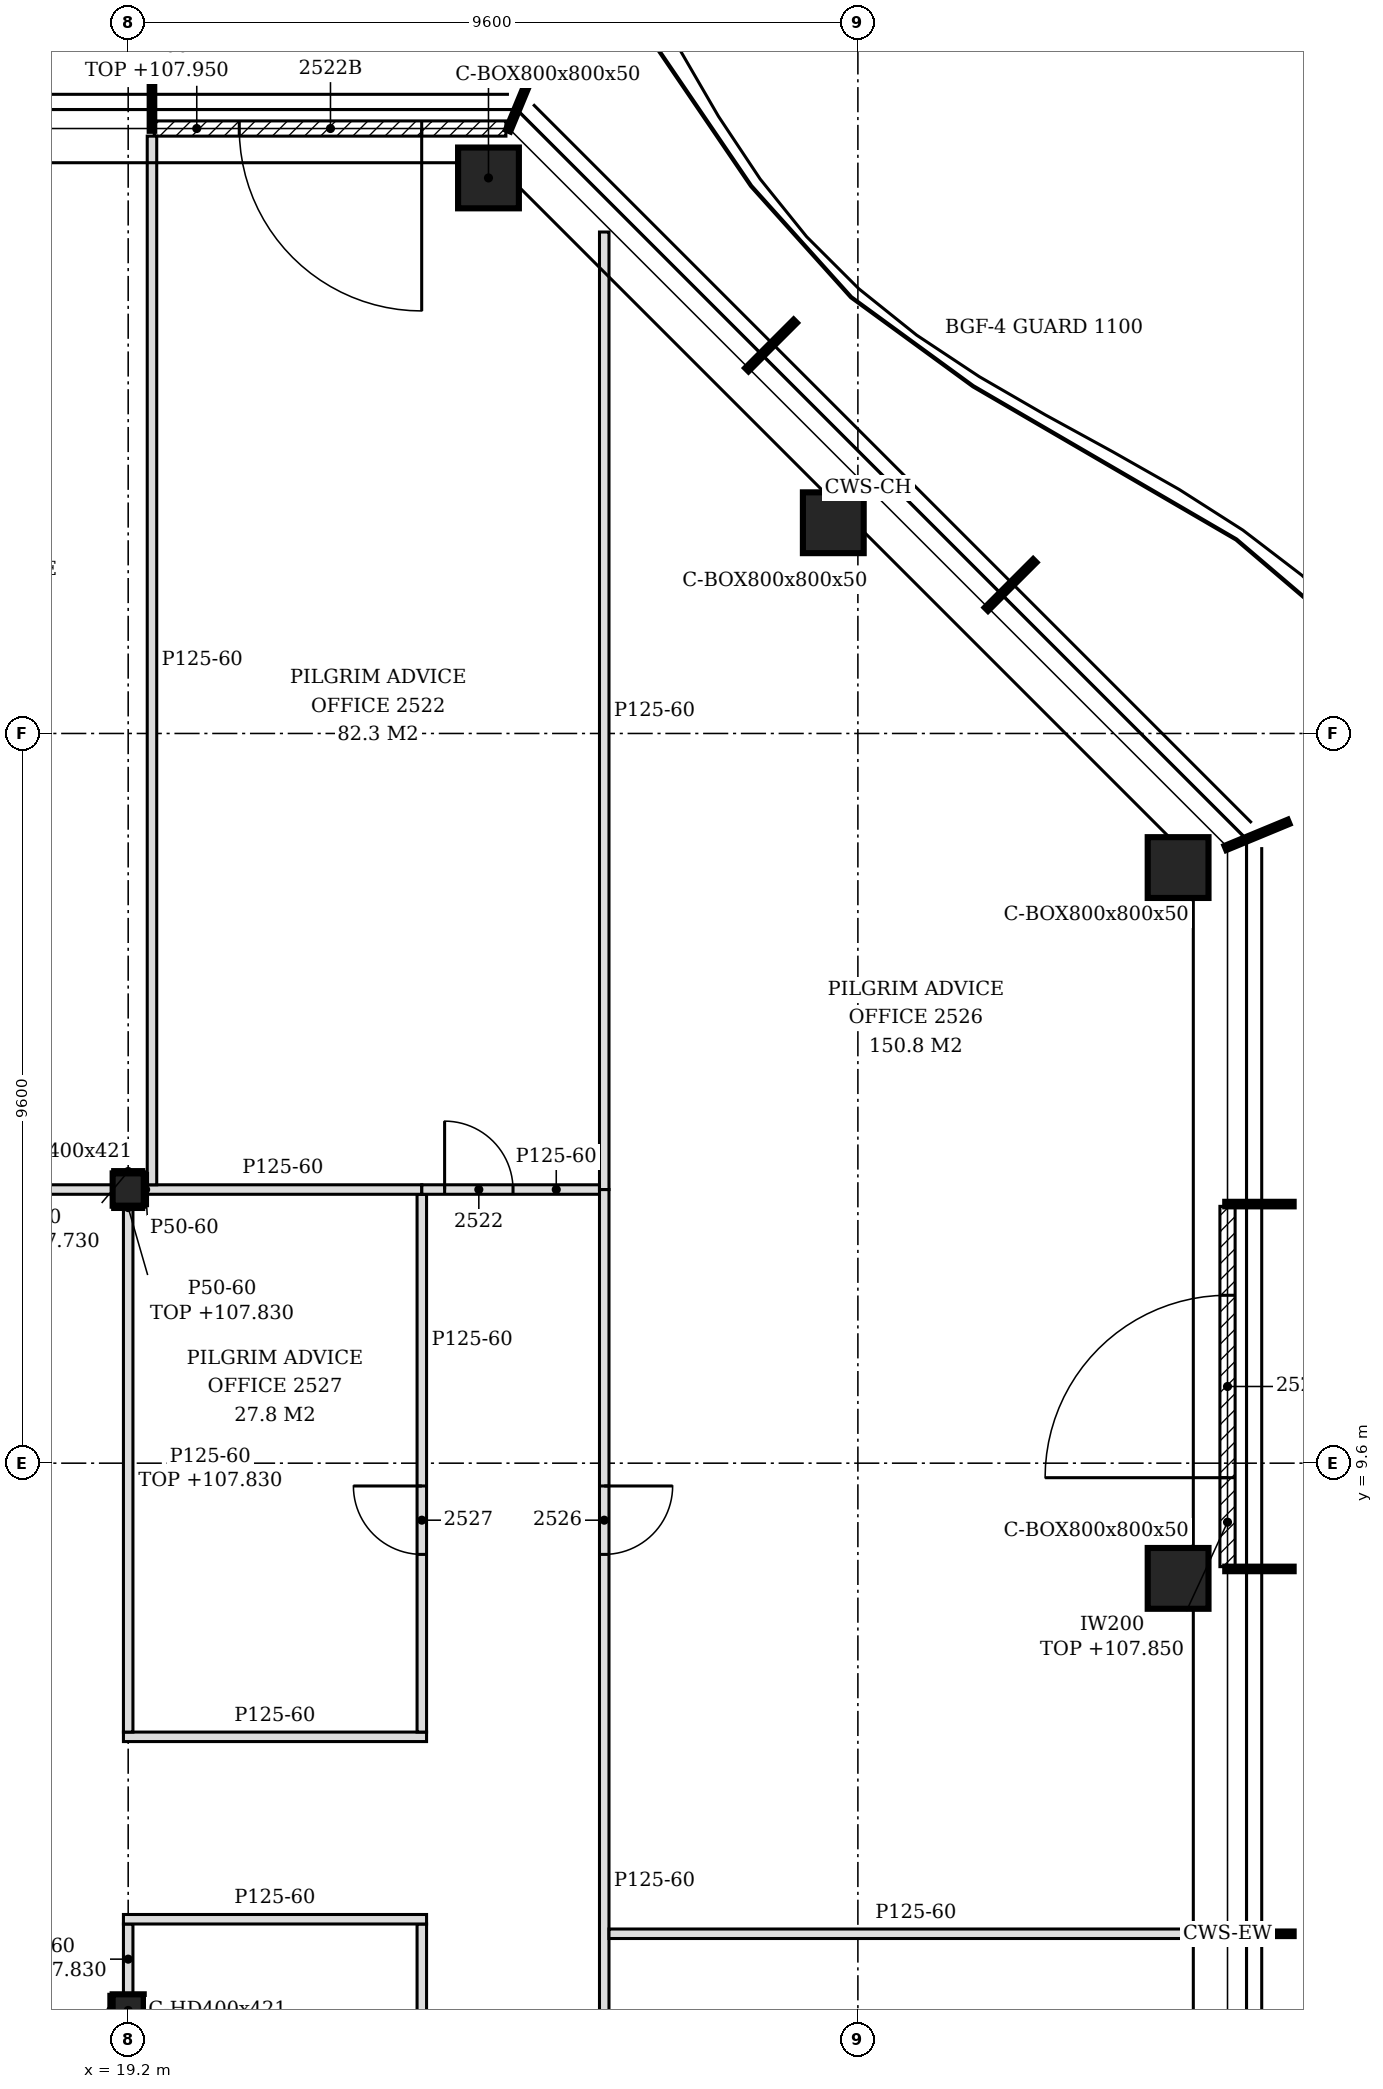
"""IFC4 building model, lengths in metres.
Left out: names, types, materials, properties, quantities, classifications, styles, units other than length and angle.
Written with IfcOpenShell. Run it as: python <this file> out.ifc"""

import sys

from ifc_helpers import new_model, si_unit, direction, frame, frame_2d, origin, origin_2d, place, context, subcontext, project, spatial, polyline, rectangle, hollow_rectangle, i_section, outline, extrude, clip, halfspace, element, fill, save


model = new_model("IFC4")
c1 = context("Model", 3, precision=1e-05, world=origin(), true_north=direction((0.0, 1.0)))
c2 = subcontext(c1, "Body", "Model", "MODEL_VIEW")
j1 = project(units=[si_unit("LENGTHUNIT", "METRE"), si_unit("PLANEANGLEUNIT", "RADIAN")], contexts=[c1])
p1 = place(None, origin())
s1 = spatial("IfcSite", under=j1, at=p1, CompositionType="ELEMENT")
p2 = place(p1, origin())
s2 = spatial("IfcBuilding", under=s1, at=p2, CompositionType="ELEMENT")
p3 = place(p2, frame((0.0, 0.0, 105.0)))
s3 = spatial("IfcBuildingStorey", under=s2, at=p3, CompositionType="ELEMENT", Elevation=105.0)
for number, where, z_axis, x_axis in (
    (1, (33.013, 8.084, -0.15), (0.282, 0.188, 0.941), (-0.555, 0.832, 0.0)),
    (2, (33.013, 17.436, -0.15), (0.282, 0.188, 0.941), (-0.555, 0.832, 0.0)),
    (3, (28.477, 21.972, -0.15), (0.282, 0.188, 0.941), (-0.555, 0.832, 0.0)),
    (4, (23.94, 26.509, -0.15), (0.282, 0.188, 0.941), (-0.555, 0.832, 0.0)),
):
    element("IfcColumn", number, at=place(p3, frame(where, z_axis=z_axis, x_axis=x_axis)), inside=s3, PredefinedType="COLUMN", context=c2, shape_type="Clipping", body=[
        clip(clip(extrude(hollow_rectangle(XDim=0.8, YDim=0.8, WallThickness=0.05, at=origin_2d()), origin(), (0.0, 0.0, 1.0), 3.826), halfspace(frame((0.0, 0.0, 0.024), z_axis=(0.0, 0.0, 1.0), x_axis=(1.0, 0.0, 0.0)), True)), halfspace(frame((0.0, 0.0, 3.802), z_axis=(0.0, 0.0, 1.0), x_axis=(1.0, 0.0, 0.0)), False)),
    ])
for number, where, z_axis, x_axis in (
    (5, (19.2, 2.4, -0.15), (0.0, 0.0, 1.0), (1.0, 0.0, 0.0)),
    (6, (19.2, 13.2, -0.15), (0.0, 0.0, 1.0), (1.0, 0.0, 0.0)),
):
    element("IfcColumn", number, at=place(p3, frame(where, z_axis=z_axis, x_axis=x_axis)), inside=s3, PredefinedType="COLUMN", context=c2, shape_type="SweptSolid", body=[
        extrude(i_section(OverallWidth=0.409, OverallDepth=0.425, WebThickness=0.033, FlangeThickness=0.052, FilletRadius=0.015, at=origin_2d()), origin(), (0.0, 0.0, 1.0), 3.6),
    ])
p4 = place(p3, frame((33.663, 8.239, 0.0), z_axis=(0.0, 0.0, 1.0), x_axis=(0.0, 1.0, 0.0)))
e7 = element("IfcWall", 7, at=p4, inside=s3, PredefinedType="NOTDEFINED", context=c2, shape_type="SweptSolid", body=[
    extrude(rectangle(XDim=4.74, YDim=0.2, at=frame_2d((2.37, 0.0))), origin(), (0.0, 0.0, 1.0), 2.85),
])
p5 = place(p4, frame((1.17, 0.0, 0.0)))
e8 = element("IfcOpeningElement", 8, at=p5, cuts=e7, PredefinedType="OPENING", context=c2, shape_type="SweptSolid", body=[
    extrude(rectangle(XDim=2.4, YDim=2.4, at=frame_2d((1.2, 1.2))), frame((0.0, 0.11, 0.0), z_axis=(0.0, -1.0, 0.0), x_axis=(1.0, 0.0, 0.0)), (0.0, 0.0, 1.0), 0.22),
])
p6 = place(p3, frame((24.169, 27.159, 0.0), z_axis=(0.0, 0.0, 1.0), x_axis=(-1.0, 0.0, 0.0)))
e9 = element("IfcWall", 9, at=p6, inside=s3, PredefinedType="NOTDEFINED", context=c2, shape_type="SweptSolid", body=[
    extrude(rectangle(XDim=4.626, YDim=0.2, at=frame_2d((2.313, 0.0))), origin(), (0.0, 0.0, 1.0), 2.95),
])
p7 = place(p6, frame((1.108, 0.0, 0.0)))
e10 = element("IfcOpeningElement", 10, at=p7, cuts=e9, PredefinedType="OPENING", context=c2, shape_type="SweptSolid", body=[
    extrude(rectangle(XDim=2.4, YDim=2.4, at=frame_2d((1.2, 1.2))), frame((0.0, 0.11, 0.0), z_axis=(0.0, -1.0, 0.0), x_axis=(1.0, 0.0, 0.0)), (0.0, 0.0, 1.0), 0.22),
])
p8 = place(p3, frame((25.463, -14.2, 0.0), z_axis=(0.0, 0.0, 1.0), x_axis=(0.0, 1.0, 0.0)))
e11 = element("IfcWall", 11, at=p8, inside=s3, PredefinedType="PARTITIONING", context=c2, shape_type="SweptSolid", body=[
    extrude(outline(polyline([(0.0, 0.0), (27.4, 0.0), (27.4, 3.45), (23.238, 3.45), (23.236, 2.83), (23.018, 2.83), (23.016, 3.45), (18.438, 3.45), (18.436, 2.83), (18.218, 2.83), (18.216, 3.45), (13.638, 3.45), (13.636, 2.83), (13.418, 2.83), (13.416, 3.45), (8.838, 3.45), (8.836, 2.83), (8.618, 2.83), (8.616, 3.45), (4.038, 3.45), (4.036, 2.83), (3.818, 2.83), (3.816, 3.45), (0.0, 3.45), (0.0, 0.0)])), frame((0.0, 0.062, 0.0), z_axis=(0.0, -1.0, 0.0), x_axis=(1.0, 0.0, 0.0)), (0.0, 0.0, 1.0), 0.125),
])
p9 = place(p8, frame((6.809, 0.0, 0.0)))
e12 = element("IfcOpeningElement", 12, at=p9, cuts=e11, PredefinedType="OPENING", context=c2, shape_type="SweptSolid", body=[
    extrude(rectangle(XDim=0.9, YDim=2.1, at=frame_2d((0.45, 1.05))), frame((0.0, 0.073, 0.0), z_axis=(0.0, -1.0, 0.0), x_axis=(1.0, 0.0, 0.0)), (0.0, 0.0, 1.0), 0.145),
])
p10 = place(p8, frame((9.709, 0.0, 0.0)))
e13 = element("IfcOpeningElement", 13, at=p10, cuts=e11, PredefinedType="OPENING", context=c2, shape_type="SweptSolid", body=[
    extrude(rectangle(XDim=0.9, YDim=2.1, at=frame_2d((0.45, 1.05))), frame((0.0, 0.073, 0.0), z_axis=(0.0, -1.0, 0.0), x_axis=(1.0, 0.0, 0.0)), (0.0, 0.0, 1.0), 0.145),
])
p11 = place(p8, frame((13.109, 0.0, 0.0)))
e14 = element("IfcOpeningElement", 14, at=p11, cuts=e11, PredefinedType="OPENING", context=c2, shape_type="SweptSolid", body=[
    extrude(rectangle(XDim=0.9, YDim=2.1, at=frame_2d((0.45, 1.05))), frame((0.0, 0.073, 0.0), z_axis=(0.0, -1.0, 0.0), x_axis=(1.0, 0.0, 0.0)), (0.0, 0.0, 1.0), 0.145),
])
p12 = place(p8, frame((22.6, 0.0, 0.0)))
e15 = element("IfcOpeningElement", 15, at=p12, cuts=e11, PredefinedType="OPENING", context=c2, shape_type="SweptSolid", body=[
    extrude(rectangle(XDim=0.9, YDim=2.1, at=frame_2d((0.45, 1.05))), frame((0.0, 0.073, 0.0), z_axis=(0.0, -1.0, 0.0), x_axis=(1.0, 0.0, 0.0)), (0.0, 0.0, 1.0), 0.145),
])
p13 = place(p3, frame((23.063, -11.738, 0.0), z_axis=(0.0, 0.0, 1.0), x_axis=(0.0, 1.0, 0.0)))
e16 = element("IfcWall", 16, at=p13, inside=s3, PredefinedType="PARTITIONING", context=c2, shape_type="SweptSolid", body=[
    extrude(outline(polyline([(0.0, 0.0), (15.275, 0.0), (15.275, 3.45), (11.175, 3.45), (11.173, 2.83), (10.955, 2.83), (10.953, 3.45), (6.375, 3.45), (6.373, 2.83), (6.155, 2.83), (6.153, 3.45), (1.575, 3.45), (1.573, 2.83), (1.355, 2.83), (1.353, 3.45), (0.0, 3.45), (0.0, 0.0)])), frame((0.0, 0.062, 0.0), z_axis=(0.0, -1.0, 0.0), x_axis=(1.0, 0.0, 0.0)), (0.0, 0.0, 1.0), 0.125),
])
p14 = place(p13, frame((7.238, 0.0, 0.0)))
e17 = element("IfcOpeningElement", 17, at=p14, cuts=e16, PredefinedType="OPENING", context=c2, shape_type="SweptSolid", body=[
    extrude(rectangle(XDim=0.9, YDim=2.1, at=frame_2d((0.45, 1.05))), frame((0.0, 0.073, 0.0), z_axis=(0.0, -1.0, 0.0), x_axis=(1.0, 0.0, 0.0)), (0.0, 0.0, 1.0), 0.145),
])
p15 = place(p3, frame((19.2, 2.613, 0.0), z_axis=(0.0, 0.0, 1.0), x_axis=(0.0, 1.0, 0.0)))
e18 = element("IfcWall", 18, at=p15, inside=s3, PredefinedType="PARTITIONING", context=c2, shape_type="SweptSolid", body=[
    extrude(rectangle(XDim=0.925, YDim=0.125, at=frame_2d((0.462, 0.0))), origin(), (0.0, 0.0, 1.0), 2.83),
])
p16 = place(p3, frame((25.525, 3.409, 0.0), z_axis=(0.0, 0.0, 1.0), x_axis=(1.0, 0.0, 0.0)))
e19 = element("IfcWall", 19, at=p16, inside=s3, PredefinedType="PARTITIONING", context=c2, shape_type="SweptSolid", body=[
    extrude(rectangle(XDim=8.077, YDim=0.125, at=frame_2d((4.039, 0.0))), origin(), (0.0, 0.0, 1.0), 3.45),
])
for number, where, z_axis, x_axis in (
    (20, (19.137, 3.6, 0.0), (0.0, 0.0, 1.0), (1.0, 0.0, 0.0)),
    (21, (19.137, 6.0, 0.0), (0.0, 0.0, 1.0), (1.0, 0.0, 0.0)),
):
    element("IfcWall", number, at=place(p3, frame(where, z_axis=z_axis, x_axis=x_axis)), inside=s3, PredefinedType="PARTITIONING", context=c2, shape_type="SweptSolid", body=[
        extrude(outline(polyline([(0.0, 0.0), (3.988, 0.0), (3.988, 3.45), (0.212, 3.45), (0.21, 2.83), (0.0, 2.83), (0.0, 0.0)])), frame((0.0, 0.062, 0.0), z_axis=(0.0, -1.0, 0.0), x_axis=(1.0, 0.0, 0.0)), (0.0, 0.0, 1.0), 0.125),
    ])
p17 = place(p3, frame((19.2, 6.062, 0.0), z_axis=(0.0, 0.0, 1.0), x_axis=(0.0, 1.0, 0.0)))
e22 = element("IfcWall", 22, at=p17, inside=s3, PredefinedType="PARTITIONING", context=c2, shape_type="SweptSolid", body=[
    extrude(rectangle(XDim=6.925, YDim=0.125, at=frame_2d((3.462, 0.0))), origin(), (0.0, 0.0, 1.0), 2.83),
])
p18 = place(p3, frame((23.063, 6.062, 0.0), z_axis=(0.0, 0.0, 1.0), x_axis=(0.0, 1.0, 0.0)))
e23 = element("IfcWall", 23, at=p18, inside=s3, PredefinedType="PARTITIONING", context=c2, shape_type="SweptSolid", body=[
    extrude(outline(polyline([(0.0, 0.0), (7.075, 0.0), (7.075, 3.45), (2.975, 3.45), (2.973, 2.83), (2.755, 2.83), (2.753, 3.45), (0.0, 3.45), (0.0, 0.0)])), frame((0.0, 0.062, 0.0), z_axis=(0.0, -1.0, 0.0), x_axis=(1.0, 0.0, 0.0)), (0.0, 0.0, 1.0), 0.125),
])
p19 = place(p18, frame((2.337, 0.0, 0.0)))
e24 = element("IfcOpeningElement", 24, at=p19, cuts=e23, PredefinedType="OPENING", context=c2, shape_type="SweptSolid", body=[
    extrude(rectangle(XDim=0.9, YDim=2.1, at=frame_2d((0.45, 1.05))), frame((0.0, 0.073, 0.0), z_axis=(0.0, -1.0, 0.0), x_axis=(1.0, 0.0, 0.0)), (0.0, 0.0, 1.0), 0.145),
])
p20 = place(p3, frame((7.405, 13.2, 0.0), z_axis=(0.0, 0.0, 1.0), x_axis=(1.0, 0.0, 0.0)))
e25 = element("IfcWall", 25, at=p20, inside=s3, PredefinedType="PARTITIONING", context=c2, shape_type="SweptSolid", body=[
    extrude(rectangle(XDim=11.591, YDim=0.125, at=frame_2d((5.795, 0.0))), origin(), (0.0, 0.0, 1.0), 2.83),
])
p21 = place(p20, frame((1.309, 0.0, 0.0)))
e26 = element("IfcOpeningElement", 26, at=p21, cuts=e25, PredefinedType="OPENING", context=c2, shape_type="SweptSolid", body=[
    extrude(rectangle(XDim=0.9, YDim=2.1, at=frame_2d((0.45, 1.05))), frame((0.0, 0.073, 0.0), z_axis=(0.0, -1.0, 0.0), x_axis=(1.0, 0.0, 0.0)), (0.0, 0.0, 1.0), 0.145),
])
p22 = place(p20, frame((2.809, 0.0, 0.0)))
e27 = element("IfcOpeningElement", 27, at=p22, cuts=e25, PredefinedType="OPENING", context=c2, shape_type="SweptSolid", body=[
    extrude(rectangle(XDim=0.9, YDim=2.1, at=frame_2d((0.45, 1.05))), frame((0.0, 0.073, 0.0), z_axis=(0.0, -1.0, 0.0), x_axis=(1.0, 0.0, 0.0)), (0.0, 0.0, 1.0), 0.145),
])
p23 = place(p20, frame((7.608, 0.0, 0.0)))
e28 = element("IfcOpeningElement", 28, at=p23, cuts=e25, PredefinedType="OPENING", context=c2, shape_type="SweptSolid", body=[
    extrude(rectangle(XDim=0.9, YDim=2.1, at=frame_2d((0.45, 1.05))), frame((0.0, 0.073, 0.0), z_axis=(0.0, -1.0, 0.0), x_axis=(1.0, 0.0, 0.0)), (0.0, 0.0, 1.0), 0.145),
])
p24 = place(p3, frame((19.405, 13.2, 0.0), z_axis=(0.0, 0.0, 1.0), x_axis=(1.0, 0.0, 0.0)))
e29 = element("IfcWall", 29, at=p24, inside=s3, PredefinedType="PARTITIONING", context=c2, shape_type="SweptSolid", body=[
    extrude(rectangle(XDim=3.658, YDim=0.125, at=frame_2d((1.829, 0.0))), origin(), (0.0, 0.0, 1.0), 3.45),
])
p25 = place(p3, frame((23.063, 13.2, 0.0), z_axis=(0.0, 0.0, 1.0), x_axis=(1.0, 0.0, 0.0)))
e30 = element("IfcWall", 30, at=p25, inside=s3, PredefinedType="PARTITIONING", context=c2, shape_type="SweptSolid", body=[
    extrude(rectangle(XDim=2.337, YDim=0.125, at=frame_2d((1.169, 0.0))), origin(), (0.0, 0.0, 1.0), 3.45),
])
p26 = place(p25, frame((0.3, 0.0, 0.0)))
e31 = element("IfcOpeningElement", 31, at=p26, cuts=e30, PredefinedType="OPENING", context=c2, shape_type="SweptSolid", body=[
    extrude(rectangle(XDim=0.9, YDim=2.1, at=frame_2d((0.45, 1.05))), frame((0.0, 0.073, 0.0), z_axis=(0.0, -1.0, 0.0), x_axis=(1.0, 0.0, 0.0)), (0.0, 0.0, 1.0), 0.145),
])
p27 = place(p3, frame((25.463, 13.2, 0.0), z_axis=(0.0, 0.0, 1.0), x_axis=(0.0, 1.0, 0.0)))
e32 = element("IfcWall", 32, at=p27, inside=s3, PredefinedType="PARTITIONING", context=c2, shape_type="SweptSolid", body=[
    extrude(outline(polyline([(0.0, 0.0), (12.597, 0.0), (12.597, 3.45), (10.228, 3.45), (10.226, 2.93), (10.028, 2.93), (10.026, 3.45), (5.438, 3.45), (5.436, 2.83), (5.218, 2.83), (5.216, 3.45), (0.638, 3.45), (0.636, 2.83), (0.418, 2.83), (0.416, 3.45), (0.0, 3.45), (0.0, 0.0)])), frame((0.0, 0.062, 0.0), z_axis=(0.0, -1.0, 0.0), x_axis=(1.0, 0.0, 0.0)), (0.0, 0.0, 1.0), 0.125),
])
p28 = place(p3, frame((19.513, 13.262, 0.0), z_axis=(0.0, 0.0, 1.0), x_axis=(0.0, 1.0, 0.0)))
e33 = element("IfcWall", 33, at=p28, inside=s3, PredefinedType="PARTITIONING", context=c2, shape_type="SweptSolid", body=[
    extrude(outline(polyline([(0.0, 0.0), (13.796, 0.0), (13.796, 3.45), (10.165, 3.45), (10.163, 2.93), (9.965, 2.93), (9.963, 3.45), (5.375, 3.45), (5.373, 2.83), (5.155, 2.83), (5.153, 3.45), (0.575, 3.45), (0.573, 2.83), (0.355, 2.83), (0.353, 3.45), (0.0, 3.45), (0.0, 0.0)])), frame((0.0, 0.062, 0.0), z_axis=(0.0, -1.0, 0.0), x_axis=(1.0, 0.0, 0.0)), (0.0, 0.0, 1.0), 0.125),
])
for number, where, z_axis, x_axis in (
    (34, (18.97, 2.188, 0.0), (0.0, 0.0, 1.0), (0.0, 1.0, 0.0)),
    (35, (19.429, 12.988, 0.0), (0.0, 0.0, 1.0), (0.0, 1.0, 0.0)),
):
    element("IfcWall", number, at=place(p3, frame(where, z_axis=z_axis, x_axis=x_axis)), inside=s3, PredefinedType="PARTITIONING", context=c2, shape_type="SweptSolid", body=[
        extrude(rectangle(XDim=0.425, YDim=0.05, at=frame_2d((0.212, 0.0))), origin(), (0.0, 0.0, 1.0), 3.45),
    ])
p29 = place(p3, frame((18.996, 13.438, 0.0), z_axis=(0.0, 0.0, 1.0), x_axis=(1.0, 0.0, 0.0)))
e36 = element("IfcWall", 36, at=p29, inside=s3, PredefinedType="PARTITIONING", context=c2, shape_type="SweptSolid", body=[
    extrude(rectangle(XDim=0.409, YDim=0.05, at=frame_2d((0.205, 0.0))), origin(), (0.0, 0.0, 1.0), 2.73),
])
p30 = place(p3, frame((18.996, 12.962, 0.0), z_axis=(0.0, 0.0, 1.0), x_axis=(1.0, 0.0, 0.0)))
e37 = element("IfcWall", 37, at=p30, inside=s3, PredefinedType="PARTITIONING", context=c2, shape_type="SweptSolid", body=[
    extrude(rectangle(XDim=0.409, YDim=0.05, at=frame_2d((0.205, 0.0))), origin(), (0.0, 0.0, 1.0), 2.83),
])
p31 = place(p5, origin())
e38 = element("IfcDoor", 38, at=p31, inside=s3, OperationType="SINGLE_SWING_LEFT", PredefinedType="DOOR", context=c2, shape_type="SweptSolid", body=[
    extrude(rectangle(XDim=2.4, YDim=2.4, at=frame_2d((1.2, 1.2))), frame((0.0, 0.025, 0.0), z_axis=(0.0, -1.0, 0.0), x_axis=(1.0, 0.0, 0.0)), (0.0, 0.0, 1.0), 0.05),
])
fill(e8, e38)
p32 = place(p7, origin())
e39 = element("IfcDoor", 39, at=p32, inside=s3, OperationType="SINGLE_SWING_LEFT", PredefinedType="DOOR", context=c2, shape_type="SweptSolid", body=[
    extrude(rectangle(XDim=2.4, YDim=2.4, at=frame_2d((1.2, 1.2))), frame((0.0, 0.025, 0.0), z_axis=(0.0, -1.0, 0.0), x_axis=(1.0, 0.0, 0.0)), (0.0, 0.0, 1.0), 0.05),
])
fill(e10, e39)
p33 = place(p26, origin())
e40 = element("IfcDoor", 40, at=p33, inside=s3, OperationType="SINGLE_SWING_LEFT", PredefinedType="DOOR", context=c2, shape_type="SweptSolid", body=[
    extrude(rectangle(XDim=0.9, YDim=2.1, at=frame_2d((0.45, 1.05))), frame((0.0, 0.025, 0.0), z_axis=(0.0, -1.0, 0.0), x_axis=(1.0, 0.0, 0.0)), (0.0, 0.0, 1.0), 0.05),
])
fill(e31, e40)
p34 = place(p12, frame((0.9, 0.0, 0.0), z_axis=(0.0, 0.0, 1.0), x_axis=(-1.0, 0.0, 0.0)))
e41 = element("IfcDoor", 41, at=p34, inside=s3, OperationType="SINGLE_SWING_LEFT", PredefinedType="DOOR", context=c2, shape_type="SweptSolid", body=[
    extrude(rectangle(XDim=0.9, YDim=2.1, at=frame_2d((0.45, 1.05))), frame((0.0, 0.025, 0.0), z_axis=(0.0, -1.0, 0.0), x_axis=(1.0, 0.0, 0.0)), (0.0, 0.0, 1.0), 0.05),
])
fill(e15, e41)
p35 = place(p19, origin())
e42 = element("IfcDoor", 42, at=p35, inside=s3, OperationType="SINGLE_SWING_RIGHT", PredefinedType="DOOR", context=c2, shape_type="SweptSolid", body=[
    extrude(rectangle(XDim=0.9, YDim=2.1, at=frame_2d((0.45, 1.05))), frame((0.0, 0.025, 0.0), z_axis=(0.0, -1.0, 0.0), x_axis=(1.0, 0.0, 0.0)), (0.0, 0.0, 1.0), 0.05),
])
fill(e24, e42)
save(model, sys.argv[1])
